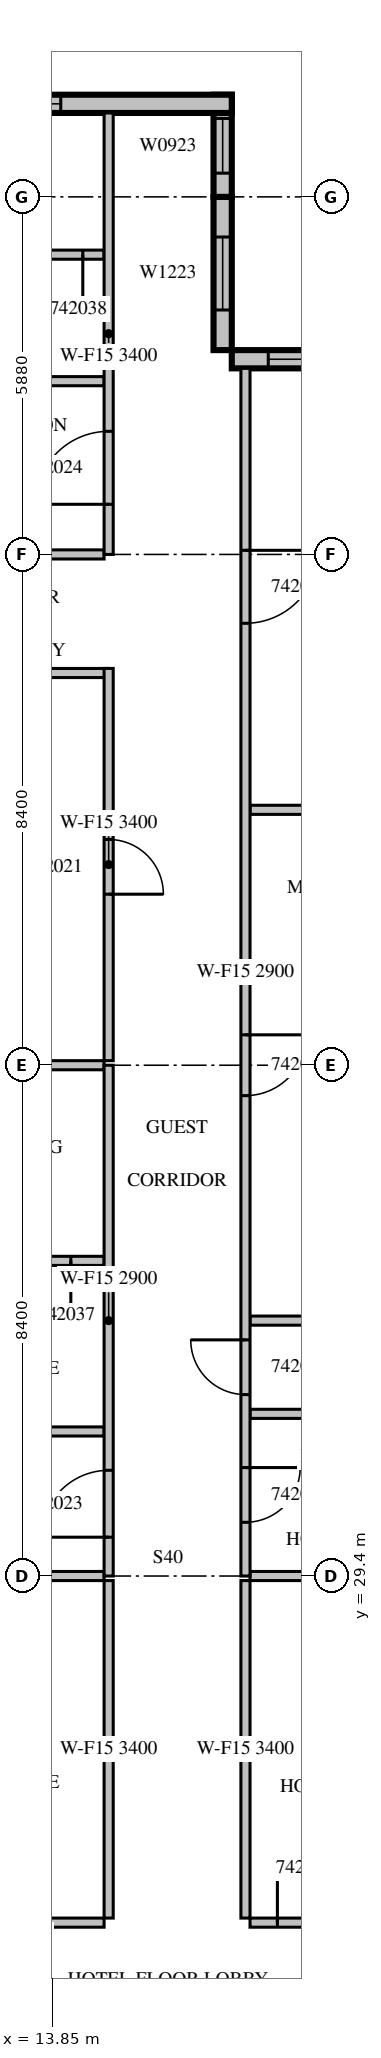
"""IFC4 building model, lengths in metres.
Left out: names, types, materials, properties, quantities, classifications, styles, units other than length and angle.
Written with IfcOpenShell. Run it as: python <this file> out.ifc"""

import sys

from ifc_helpers import new_model, si_unit, direction, frame, frame_2d, origin, place, context, subcontext, project, spatial, rectangle, extrude, source, transform, mapped, element, fill, save


model = new_model("IFC4")
c1 = context("Model", 3, precision=1e-05, world=origin(), true_north=direction((0.0, 1.0)))
c2 = subcontext(c1, "Body", "Model", "MODEL_VIEW")
j1 = project(units=[si_unit("LENGTHUNIT", "METRE"), si_unit("PLANEANGLEUNIT", "RADIAN")], contexts=[c1])
p1 = place(None, origin())
s1 = spatial("IfcSite", under=j1, at=p1, CompositionType="ELEMENT")
p2 = place(p1, origin())
s2 = spatial("IfcBuilding", under=s1, at=p2, CompositionType="ELEMENT")
p3 = place(p2, frame((0.0, 0.0, 193.0)))
s3 = spatial("IfcBuildingStorey", under=s2, at=p3, CompositionType="ELEMENT", Elevation=193.0)
m1 = source(origin(), c2, "Body", "SweptSolid", [
    extrude(rectangle(XDim=4.2, YDim=0.3, at=frame_2d((2.1, 0.0))), origin(), (0.0, 0.0, 1.0), 3.4),
])
p4 = place(p3, frame((21.0, 49.41, 0.0), z_axis=(0.0, 0.0, 1.0), x_axis=(-1.0, 0.0, 0.0)))
e1 = element("IfcWall", 1, at=p4, inside=s3, PredefinedType="STANDARD", context=c2, shape_type="MappedRepresentation", body=[
    mapped(m1, transform((0.0, 0.0, 0.0), scale=1.0)),
])
m2 = source(origin(), c2, "Body", "SweptSolid", [
    extrude(rectangle(XDim=3.0, YDim=2.3, at=frame_2d((1.5, 1.15))), frame((0.0, 0.16, 0.0), z_axis=(0.0, -1.0, 0.0), x_axis=(1.0, 0.0, 0.0)), (0.0, 0.0, 1.0), 0.32),
])
p5 = place(p4, frame((0.6, 0.0, 0.6)))
e2 = element("IfcOpeningElement", 2, at=p5, cuts=e1, PredefinedType="OPENING", context=c2, shape_type="MappedRepresentation", body=[
    mapped(m2, transform((0.0, 0.0, 0.0), scale=1.0)),
])
m3 = source(origin(), c2, "Body", "SweptSolid", [
    extrude(rectangle(XDim=2.52, YDim=0.3, at=frame_2d((1.26, 0.0))), origin(), (0.0, 0.0, 1.0), 3.4),
])
p6 = place(p3, frame((16.65, 49.56, 0.0), z_axis=(0.0, 0.0, 1.0), x_axis=(0.0, 1.0, 0.0)))
e3 = element("IfcWall", 3, at=p6, inside=s3, PredefinedType="STANDARD", context=c2, shape_type="MappedRepresentation", body=[
    mapped(m3, transform((0.0, 0.0, 0.0), scale=1.0)),
])
m4 = source(origin(), c2, "Body", "SweptSolid", [
    extrude(rectangle(XDim=1.2, YDim=2.3, at=frame_2d((0.6, 1.15))), frame((0.0, 0.16, 0.0), z_axis=(0.0, -1.0, 0.0), x_axis=(1.0, 0.0, 0.0)), (0.0, 0.0, 1.0), 0.32),
])
p7 = place(p6, frame((0.66, 0.0, 0.6)))
e4 = element("IfcOpeningElement", 4, at=p7, cuts=e3, PredefinedType="OPENING", context=c2, shape_type="MappedRepresentation", body=[
    mapped(m4, transform((0.0, 0.0, 0.0), scale=1.0)),
])
m5 = source(origin(), c2, "Body", "SweptSolid", [
    extrude(rectangle(XDim=1.68, YDim=0.3, at=frame_2d((0.84, 0.0))), origin(), (0.0, 0.0, 1.0), 3.4),
])
p8 = place(p3, frame((16.65, 52.08, 0.0), z_axis=(0.0, 0.0, 1.0), x_axis=(0.0, 1.0, 0.0)))
e5 = element("IfcWall", 5, at=p8, inside=s3, PredefinedType="STANDARD", context=c2, shape_type="MappedRepresentation", body=[
    mapped(m5, transform((0.0, 0.0, 0.0), scale=1.0)),
])
m6 = source(origin(), c2, "Body", "SweptSolid", [
    extrude(rectangle(XDim=0.9, YDim=2.3, at=frame_2d((0.45, 1.15))), frame((0.0, 0.16, 0.0), z_axis=(0.0, -1.0, 0.0), x_axis=(1.0, 0.0, 0.0)), (0.0, 0.0, 1.0), 0.32),
])
p9 = place(p8, frame((0.39, 0.0, 0.6)))
e6 = element("IfcOpeningElement", 6, at=p9, cuts=e5, PredefinedType="OPENING", context=c2, shape_type="MappedRepresentation", body=[
    mapped(m6, transform((0.0, 0.0, 0.0), scale=1.0)),
])
m7 = source(origin(), c2, "Body", "SweptSolid", [
    extrude(rectangle(XDim=10.5, YDim=0.3, at=frame_2d((5.25, 0.0))), origin(), (0.0, 0.0, 1.0), 3.4),
])
p10 = place(p3, frame((16.8, 53.61, 0.0), z_axis=(0.0, 0.0, 1.0), x_axis=(-1.0, 0.0, 0.0)))
e7 = element("IfcWall", 7, at=p10, inside=s3, PredefinedType="STANDARD", context=c2, shape_type="MappedRepresentation", body=[
    mapped(m7, transform((0.0, 0.0, 0.0), scale=1.0)),
])
m8 = source(origin(), c2, "Body", "SweptSolid", [
    extrude(rectangle(XDim=1.8, YDim=2.3, at=frame_2d((0.9, 1.15))), frame((0.0, 0.16, 0.0), z_axis=(0.0, -1.0, 0.0), x_axis=(1.0, 0.0, 0.0)), (0.0, 0.0, 1.0), 0.32),
])
p11 = place(p10, frame((8.025, 0.0, 0.6)))
e8 = element("IfcOpeningElement", 8, at=p11, cuts=e7, PredefinedType="OPENING", context=c2, shape_type="MappedRepresentation", body=[
    mapped(m8, transform((0.0, 0.0, 0.0), scale=1.0)),
])
m9 = source(origin(), c2, "Body", "SweptSolid", [
    extrude(rectangle(XDim=2.4, YDim=2.3, at=frame_2d((1.2, 1.15))), frame((0.0, 0.16, 0.0), z_axis=(0.0, -1.0, 0.0), x_axis=(1.0, 0.0, 0.0)), (0.0, 0.0, 1.0), 0.32),
])
p12 = place(p10, frame((2.812, 0.0, 0.6)))
e9 = element("IfcOpeningElement", 9, at=p12, cuts=e7, PredefinedType="OPENING", context=c2, shape_type="MappedRepresentation", body=[
    mapped(m9, transform((0.0, 0.0, 0.0), scale=1.0)),
])
p13 = place(p3, frame((10.705, 23.7, 0.0), z_axis=(0.0, 0.0, 1.0), x_axis=(1.0, 0.0, 0.0)))
e10 = element("IfcWall", 10, at=p13, inside=s3, PredefinedType="PARTITIONING", context=c2, shape_type="SweptSolid", body=[
    extrude(rectangle(XDim=3.995, YDim=0.15, at=frame_2d((1.998, 0.0))), origin(), (0.0, 0.0, 1.0), 3.4),
])
m10 = source(origin(), c2, "Body", "SweptSolid", [
    extrude(rectangle(XDim=0.9, YDim=2.1, at=frame_2d((0.45, 1.05))), frame((0.0, 0.085, 0.0), z_axis=(0.0, -1.0, 0.0), x_axis=(1.0, 0.0, 0.0)), (0.0, 0.0, 1.0), 0.17),
])
p14 = place(p13, frame((2.132, 0.0, 0.0)))
e11 = element("IfcOpeningElement", 11, at=p14, cuts=e10, PredefinedType="OPENING", context=c2, shape_type="MappedRepresentation", body=[
    mapped(m10, transform((0.0, 0.0, 0.0), scale=1.0)),
])
m11 = source(origin(), c2, "Body", "SweptSolid", [
    extrude(rectangle(XDim=3.6, YDim=0.15, at=frame_2d((1.8, 0.0))), origin(), (0.0, 0.0, 1.0), 3.4),
])
p15 = place(p3, frame((17.1, 23.7, 0.0), z_axis=(0.0, 0.0, 1.0), x_axis=(1.0, 0.0, 0.0)))
e12 = element("IfcWall", 12, at=p15, inside=s3, PredefinedType="PARTITIONING", context=c2, shape_type="MappedRepresentation", body=[
    mapped(m11, transform((0.0, 0.0, 0.0), scale=1.0)),
])
p16 = place(p15, frame((0.45, 0.0, 0.0)))
e13 = element("IfcOpeningElement", 13, at=p16, cuts=e12, PredefinedType="OPENING", context=c2, shape_type="MappedRepresentation", body=[
    mapped(m10, transform((0.0, 0.0, 0.0), scale=1.0)),
])
m12 = source(origin(), c2, "Body", "SweptSolid", [
    extrude(rectangle(XDim=5.55, YDim=0.15, at=frame_2d((2.775, 0.0))), origin(), (0.0, 0.0, 1.0), 3.4),
])
for number, where, z_axis, x_axis in (
    (14, (14.775, 23.775, 0.0), (0.0, 0.0, 1.0), (0.0, 1.0, 0.0)),
    (15, (17.025, 29.325, 0.0), (0.0, 0.0, 1.0), (0.0, -1.0, 0.0)),
):
    element("IfcWall", number, at=place(p3, frame(where, z_axis=z_axis, x_axis=x_axis)), inside=s3, PredefinedType="PARTITIONING", context=c2, shape_type="MappedRepresentation", body=[
        mapped(m12, transform((0.0, 0.0, 0.0), scale=1.0)),
    ])
m13 = source(origin(), c2, "Body", "SweptSolid", [
    extrude(rectangle(XDim=3.751, YDim=0.15, at=frame_2d((1.875, 0.0))), origin(), (0.0, 0.0, 1.0), 3.4),
])
p17 = place(p3, frame((14.7, 29.4, 0.0), z_axis=(0.0, 0.0, 1.0), x_axis=(-1.0, 0.0, 0.0)))
e16 = element("IfcWall", 16, at=p17, inside=s3, PredefinedType="PARTITIONING", context=c2, shape_type="MappedRepresentation", body=[
    mapped(m13, transform((0.0, 0.0, 0.0), scale=1.0)),
])
m14 = source(origin(), c2, "Body", "SweptSolid", [
    extrude(rectangle(XDim=3.001, YDim=0.15, at=frame_2d((1.5, 0.0))), origin(), (0.0, 0.0, 1.0), 3.4),
])
p18 = place(p3, frame((20.101, 29.4, 0.0), z_axis=(0.0, 0.0, 1.0), x_axis=(-1.0, 0.0, 0.0)))
e17 = element("IfcWall", 17, at=p18, inside=s3, PredefinedType="PARTITIONING", context=c2, shape_type="MappedRepresentation", body=[
    mapped(m14, transform((0.0, 0.0, 0.0), scale=1.0)),
])
p19 = place(p3, frame((14.775, 44.25, 0.0), z_axis=(0.0, 0.0, 1.0), x_axis=(-1.0, 0.0, 0.0)))
e18 = element("IfcWall", 18, at=p19, inside=s3, PredefinedType="PARTITIONING", context=c2, shape_type="SweptSolid", body=[
    extrude(rectangle(XDim=2.475, YDim=0.15, at=frame_2d((1.238, 0.0))), origin(), (0.0, 0.0, 1.0), 3.4),
])
m15 = source(origin(), c2, "Body", "SweptSolid", [
    extrude(rectangle(XDim=6.45, YDim=0.15, at=frame_2d((3.225, 0.0))), origin(), (0.0, 0.0, 1.0), 3.4),
])
p20 = place(p3, frame((14.775, 37.875, 0.0), z_axis=(0.0, 0.0, 1.0), x_axis=(0.0, 1.0, 0.0)))
e19 = element("IfcWall", 19, at=p20, inside=s3, PredefinedType="PARTITIONING", context=c2, shape_type="MappedRepresentation", body=[
    mapped(m15, transform((0.0, 0.0, 0.0), scale=1.0)),
])
p21 = place(p20, frame((2.737, 0.0, 0.0)))
e20 = element("IfcOpeningElement", 20, at=p21, cuts=e19, PredefinedType="OPENING", context=c2, shape_type="MappedRepresentation", body=[
    mapped(m10, transform((0.0, 0.0, 0.0), scale=1.0)),
])
m16 = source(origin(), c2, "Body", "SweptSolid", [
    extrude(rectangle(XDim=3.995, YDim=0.15, at=frame_2d((1.998, 0.0))), origin(), (0.0, 0.0, 1.0), 3.4),
])
p22 = place(p3, frame((14.7, 31.777, 0.0), z_axis=(0.0, 0.0, 1.0), x_axis=(-1.0, 0.0, 0.0)))
e21 = element("IfcWall", 21, at=p22, inside=s3, PredefinedType="PARTITIONING", context=c2, shape_type="MappedRepresentation", body=[
    mapped(m16, transform((0.0, 0.0, 0.0), scale=1.0)),
])
p23 = place(p22, frame((1.548, 0.0, 0.0)))
e22 = element("IfcOpeningElement", 22, at=p23, cuts=e21, PredefinedType="OPENING", context=c2, shape_type="MappedRepresentation", body=[
    mapped(m10, transform((0.0, 0.0, 0.0), scale=1.0)),
])
p24 = place(p3, frame((14.7, 34.583, 0.0), z_axis=(0.0, 0.0, 1.0), x_axis=(-1.0, 0.0, 0.0)))
e23 = element("IfcWall", 23, at=p24, inside=s3, PredefinedType="PARTITIONING", context=c2, shape_type="MappedRepresentation", body=[
    mapped(m16, transform((0.0, 0.0, 0.0), scale=1.0)),
])
p25 = place(p24, frame((1.548, 0.0, 0.0)))
e24 = element("IfcOpeningElement", 24, at=p25, cuts=e23, PredefinedType="OPENING", context=c2, shape_type="MappedRepresentation", body=[
    mapped(m10, transform((0.0, 0.0, 0.0), scale=1.0)),
])
p26 = place(p24, frame((0.547, 0.0, 0.0)))
e25 = element("IfcOpeningElement", 25, at=p26, cuts=e23, PredefinedType="OPENING", context=c2, shape_type="MappedRepresentation", body=[
    mapped(m10, transform((0.0, 0.0, 0.0), scale=1.0)),
])
p27 = place(p24, frame((2.547, 0.0, 0.0)))
e26 = element("IfcOpeningElement", 26, at=p27, cuts=e23, PredefinedType="OPENING", context=c2, shape_type="MappedRepresentation", body=[
    mapped(m10, transform((0.0, 0.0, 0.0), scale=1.0)),
])
p28 = place(p3, frame((14.7, 37.8, 0.0), z_axis=(0.0, 0.0, 1.0), x_axis=(-1.0, 0.0, 0.0)))
e27 = element("IfcWall", 27, at=p28, inside=s3, PredefinedType="PARTITIONING", context=c2, shape_type="MappedRepresentation", body=[
    mapped(m13, transform((0.0, 0.0, 0.0), scale=1.0)),
])
p29 = place(p3, frame((14.7, 49.049, 0.0), z_axis=(0.0, 0.0, 1.0), x_axis=(-1.0, 0.0, 0.0)))
e28 = element("IfcWall", 28, at=p29, inside=s3, PredefinedType="PARTITIONING", context=c2, shape_type="MappedRepresentation", body=[
    mapped(m11, transform((0.0, 0.0, 0.0), scale=1.0)),
])
p30 = place(p3, frame((14.7, 51.13, 0.0), z_axis=(0.0, 0.0, 1.0), x_axis=(-1.0, 0.0, 0.0)))
e29 = element("IfcWall", 29, at=p30, inside=s3, PredefinedType="PARTITIONING", context=c2, shape_type="MappedRepresentation", body=[
    mapped(m11, transform((0.0, 0.0, 0.0), scale=1.0)),
])
p31 = place(p30, frame((1.35, 0.0, 0.0)))
e30 = element("IfcOpeningElement", 30, at=p31, cuts=e29, PredefinedType="OPENING", context=c2, shape_type="MappedRepresentation", body=[
    mapped(m10, transform((0.0, 0.0, 0.0), scale=1.0)),
])
p32 = place(p30, frame((0.35, 0.0, 0.0)))
e31 = element("IfcOpeningElement", 31, at=p32, cuts=e29, PredefinedType="OPENING", context=c2, shape_type="MappedRepresentation", body=[
    mapped(m10, transform((0.0, 0.0, 0.0), scale=1.0)),
])
p33 = place(p30, frame((2.35, 0.0, 0.0)))
e32 = element("IfcOpeningElement", 32, at=p33, cuts=e29, PredefinedType="OPENING", context=c2, shape_type="MappedRepresentation", body=[
    mapped(m10, transform((0.0, 0.0, 0.0), scale=1.0)),
])
p34 = place(p3, frame((14.7, 46.2, 0.0), z_axis=(0.0, 0.0, 1.0), x_axis=(-1.0, 0.0, 0.0)))
e33 = element("IfcWall", 33, at=p34, inside=s3, PredefinedType="PARTITIONING", context=c2, shape_type="MappedRepresentation", body=[
    mapped(m11, transform((0.0, 0.0, 0.0), scale=1.0)),
])
m17 = source(origin(), c2, "Body", "SweptSolid", [
    extrude(rectangle(XDim=3.6, YDim=0.15, at=frame_2d((1.8, 0.0))), origin(), (0.0, 0.0, 1.0), 2.4),
])
for number, where, z_axis, x_axis in (
    (34, (17.1, 32.067, 0.0), (0.0, 0.0, 1.0), (1.0, 0.0, 0.0)),
    (35, (20.7, 33.6, 0.0), (0.0, 0.0, 1.0), (-1.0, 0.0, 0.0)),
):
    element("IfcWall", number, at=place(p3, frame(where, z_axis=z_axis, x_axis=x_axis)), inside=s3, PredefinedType="PARTITIONING", context=c2, shape_type="MappedRepresentation", body=[
        mapped(m17, transform((0.0, 0.0, 0.0), scale=1.0)),
    ])
p35 = place(p3, frame((20.7, 42.0, 0.0), z_axis=(0.0, 0.0, 1.0), x_axis=(-1.0, 0.0, 0.0)))
e36 = element("IfcWall", 36, at=p35, inside=s3, PredefinedType="PARTITIONING", context=c2, shape_type="MappedRepresentation", body=[
    mapped(m11, transform((0.0, 0.0, 0.0), scale=1.0)),
])
m18 = source(origin(), c2, "Body", "SweptSolid", [
    extrude(rectangle(XDim=8.4, YDim=0.15, at=frame_2d((4.2, 0.0))), origin(), (0.0, 0.0, 1.0), 2.9),
])
p36 = place(p3, frame((14.775, 29.4, 0.0), z_axis=(0.0, 0.0, 1.0), x_axis=(0.0, 1.0, 0.0)))
e37 = element("IfcWall", 37, at=p36, inside=s3, PredefinedType="PARTITIONING", context=c2, shape_type="MappedRepresentation", body=[
    mapped(m18, transform((0.0, 0.0, 0.0), scale=1.0)),
])
m19 = source(origin(), c2, "Body", "SweptSolid", [
    extrude(rectangle(XDim=1.1, YDim=2.1, at=frame_2d((0.55, 1.05))), frame((0.0, 0.085, 0.0), z_axis=(0.0, -1.0, 0.0), x_axis=(1.0, 0.0, 0.0)), (0.0, 0.0, 1.0), 0.17),
])
p37 = place(p36, frame((0.638, 0.0, 0.0)))
e38 = element("IfcOpeningElement", 38, at=p37, cuts=e37, PredefinedType="OPENING", context=c2, shape_type="MappedRepresentation", body=[
    mapped(m19, transform((0.0, 0.0, 0.0), scale=1.0)),
])
m20 = source(origin(), c2, "Body", "SweptSolid", [
    extrude(rectangle(XDim=7.26, YDim=0.15, at=frame_2d((3.63, 0.0))), origin(), (0.0, 0.0, 1.0), 3.4),
])
p38 = place(p3, frame((14.775, 46.2, 0.0), z_axis=(0.0, 0.0, 1.0), x_axis=(0.0, 1.0, 0.0)))
e39 = element("IfcWall", 39, at=p38, inside=s3, PredefinedType="PARTITIONING", context=c2, shape_type="MappedRepresentation", body=[
    mapped(m20, transform((0.0, 0.0, 0.0), scale=1.0)),
])
m21 = source(origin(), c2, "Body", "SweptSolid", [
    extrude(rectangle(XDim=1.2, YDim=2.1, at=frame_2d((0.6, 1.05))), frame((0.0, 0.085, 0.0), z_axis=(0.0, -1.0, 0.0), x_axis=(1.0, 0.0, 0.0)), (0.0, 0.0, 1.0), 0.17),
])
p39 = place(p38, frame((0.825, 0.0, 0.0)))
e40 = element("IfcOpeningElement", 40, at=p39, cuts=e39, PredefinedType="OPENING", context=c2, shape_type="MappedRepresentation", body=[
    mapped(m21, transform((0.0, 0.0, 0.0), scale=1.0)),
])
m22 = source(origin(), c2, "Body", "SweptSolid", [
    extrude(rectangle(XDim=19.86, YDim=0.15, at=frame_2d((9.93, 0.0))), origin(), (0.0, 0.0, 1.0), 2.9),
])
p40 = place(p3, frame((17.025, 49.26, 0.0), z_axis=(0.0, 0.0, 1.0), x_axis=(0.0, -1.0, 0.0)))
e41 = element("IfcWall", 41, at=p40, inside=s3, PredefinedType="PARTITIONING", context=c2, shape_type="MappedRepresentation", body=[
    mapped(m22, transform((0.0, 0.0, 0.0), scale=1.0)),
])
p41 = place(p40, frame((18.076, 0.0, 0.0)))
e42 = element("IfcOpeningElement", 42, at=p41, cuts=e41, PredefinedType="OPENING", context=c2, shape_type="MappedRepresentation", body=[
    mapped(m10, transform((0.0, 0.0, 0.0), scale=1.0)),
])
p42 = place(p40, frame((15.976, 0.0, 0.0)))
e43 = element("IfcOpeningElement", 43, at=p42, cuts=e41, PredefinedType="OPENING", context=c2, shape_type="MappedRepresentation", body=[
    mapped(m10, transform((0.0, 0.0, 0.0), scale=1.0)),
])
m23 = source(origin(), c2, "Body", "SweptSolid", [
    extrude(rectangle(XDim=1.0, YDim=2.1, at=frame_2d((0.5, 1.05))), frame((0.0, 0.085, 0.0), z_axis=(0.0, -1.0, 0.0), x_axis=(1.0, 0.0, 0.0)), (0.0, 0.0, 1.0), 0.17),
])
p43 = place(p40, frame((10.96, 0.0, 0.0)))
e44 = element("IfcOpeningElement", 44, at=p43, cuts=e41, PredefinedType="OPENING", context=c2, shape_type="MappedRepresentation", body=[
    mapped(m23, transform((0.0, 0.0, 0.0), scale=1.0)),
])
p44 = place(p40, frame((2.993, 0.0, 0.0)))
e45 = element("IfcOpeningElement", 45, at=p44, cuts=e41, PredefinedType="OPENING", context=c2, shape_type="MappedRepresentation", body=[
    mapped(m21, transform((0.0, 0.0, 0.0), scale=1.0)),
])
m24 = source(origin(), c2, "Body", "SweptSolid", [
    extrude(rectangle(XDim=3.0, YDim=2.3, at=frame_2d((1.5, 1.15))), frame((0.0, 0.03, 0.0), z_axis=(0.0, -1.0, 0.0), x_axis=(1.0, 0.0, 0.0)), (0.0, 0.0, 1.0), 0.06),
])
p45 = place(p5, origin())
e46 = element("IfcWindow", 46, at=p45, inside=s3, PartitioningType="SINGLE_PANEL", PredefinedType="WINDOW", context=c2, shape_type="MappedRepresentation", body=[
    mapped(m24, transform((0.0, 0.0, 0.0), scale=1.0)),
])
fill(e2, e46)
m25 = source(origin(), c2, "Body", "SweptSolid", [
    extrude(rectangle(XDim=1.2, YDim=2.3, at=frame_2d((0.6, 1.15))), frame((0.0, 0.03, 0.0), z_axis=(0.0, -1.0, 0.0), x_axis=(1.0, 0.0, 0.0)), (0.0, 0.0, 1.0), 0.06),
])
p46 = place(p7, origin())
e47 = element("IfcWindow", 47, at=p46, inside=s3, PartitioningType="SINGLE_PANEL", PredefinedType="WINDOW", context=c2, shape_type="MappedRepresentation", body=[
    mapped(m25, transform((0.0, 0.0, 0.0), scale=1.0)),
])
fill(e4, e47)
m26 = source(origin(), c2, "Body", "SweptSolid", [
    extrude(rectangle(XDim=0.9, YDim=2.3, at=frame_2d((0.45, 1.15))), frame((0.0, 0.03, 0.0), z_axis=(0.0, -1.0, 0.0), x_axis=(1.0, 0.0, 0.0)), (0.0, 0.0, 1.0), 0.06),
])
p47 = place(p9, origin())
e48 = element("IfcWindow", 48, at=p47, inside=s3, PartitioningType="SINGLE_PANEL", PredefinedType="WINDOW", context=c2, shape_type="MappedRepresentation", body=[
    mapped(m26, transform((0.0, 0.0, 0.0), scale=1.0)),
])
fill(e6, e48)
m27 = source(origin(), c2, "Body", "SweptSolid", [
    extrude(rectangle(XDim=2.4, YDim=2.3, at=frame_2d((1.2, 1.15))), frame((0.0, 0.03, 0.0), z_axis=(0.0, -1.0, 0.0), x_axis=(1.0, 0.0, 0.0)), (0.0, 0.0, 1.0), 0.06),
])
p48 = place(p12, origin())
e49 = element("IfcWindow", 49, at=p48, inside=s3, PartitioningType="SINGLE_PANEL", PredefinedType="WINDOW", context=c2, shape_type="MappedRepresentation", body=[
    mapped(m27, transform((0.0, 0.0, 0.0), scale=1.0)),
])
fill(e9, e49)
m28 = source(origin(), c2, "Body", "SweptSolid", [
    extrude(rectangle(XDim=0.9, YDim=2.1, at=frame_2d((0.45, 1.05))), frame((0.0, 0.025, 0.0), z_axis=(0.0, -1.0, 0.0), x_axis=(1.0, 0.0, 0.0)), (0.0, 0.0, 1.0), 0.05),
])
p49 = place(p16, origin())
e50 = element("IfcDoor", 50, at=p49, inside=s3, OperationType="SINGLE_SWING_LEFT", PredefinedType="DOOR", context=c2, shape_type="MappedRepresentation", body=[
    mapped(m28, transform((0.0, 0.0, 0.0), scale=1.0)),
])
fill(e13, e50)
p50 = place(p21, origin())
e51 = element("IfcDoor", 51, at=p50, inside=s3, OperationType="SINGLE_SWING_RIGHT", PredefinedType="DOOR", context=c2, shape_type="MappedRepresentation", body=[
    mapped(m28, transform((0.0, 0.0, 0.0), scale=1.0)),
])
fill(e20, e51)
m29 = source(origin(), c2, "Body", "SweptSolid", [
    extrude(rectangle(XDim=1.1, YDim=2.1, at=frame_2d((0.55, 1.05))), frame((0.0, 0.025, 0.0), z_axis=(0.0, -1.0, 0.0), x_axis=(1.0, 0.0, 0.0)), (0.0, 0.0, 1.0), 0.05),
])
p51 = place(p37, origin())
e52 = element("IfcDoor", 52, at=p51, inside=s3, OperationType="SINGLE_SWING_LEFT", PredefinedType="DOOR", context=c2, shape_type="MappedRepresentation", body=[
    mapped(m29, transform((0.0, 0.0, 0.0), scale=1.0)),
])
fill(e38, e52)
m30 = source(origin(), c2, "Body", "SweptSolid", [
    extrude(rectangle(XDim=1.2, YDim=2.1, at=frame_2d((0.6, 1.05))), frame((0.0, 0.025, 0.0), z_axis=(0.0, -1.0, 0.0), x_axis=(1.0, 0.0, 0.0)), (0.0, 0.0, 1.0), 0.05),
])
p52 = place(p39, origin())
e53 = element("IfcDoor", 53, at=p52, inside=s3, OperationType="SINGLE_SWING_LEFT", PredefinedType="DOOR", context=c2, shape_type="MappedRepresentation", body=[
    mapped(m30, transform((0.0, 0.0, 0.0), scale=1.0)),
])
fill(e40, e53)
p53 = place(p41, origin())
e54 = element("IfcDoor", 54, at=p53, inside=s3, OperationType="SINGLE_SWING_LEFT", PredefinedType="DOOR", context=c2, shape_type="MappedRepresentation", body=[
    mapped(m28, transform((0.0, 0.0, 0.0), scale=1.0)),
])
fill(e42, e54)
p54 = place(p42, origin())
e55 = element("IfcDoor", 55, at=p54, inside=s3, OperationType="SINGLE_SWING_RIGHT", PredefinedType="DOOR", context=c2, shape_type="MappedRepresentation", body=[
    mapped(m28, transform((0.0, 0.0, 0.0), scale=1.0)),
])
fill(e43, e55)
m31 = source(origin(), c2, "Body", "SweptSolid", [
    extrude(rectangle(XDim=1.0, YDim=2.1, at=frame_2d((0.5, 1.05))), frame((0.0, 0.025, 0.0), z_axis=(0.0, -1.0, 0.0), x_axis=(1.0, 0.0, 0.0)), (0.0, 0.0, 1.0), 0.05),
])
p55 = place(p43, origin())
e56 = element("IfcDoor", 56, at=p55, inside=s3, OperationType="SINGLE_SWING_LEFT", PredefinedType="DOOR", context=c2, shape_type="MappedRepresentation", body=[
    mapped(m31, transform((0.0, 0.0, 0.0), scale=1.0)),
])
fill(e44, e56)
p56 = place(p44, origin())
e57 = element("IfcDoor", 57, at=p56, inside=s3, OperationType="SINGLE_SWING_LEFT", PredefinedType="DOOR", context=c2, shape_type="MappedRepresentation", body=[
    mapped(m30, transform((0.0, 0.0, 0.0), scale=1.0)),
])
fill(e45, e57)
p57 = place(p26, origin())
e58 = element("IfcDoor", 58, at=p57, inside=s3, OperationType="SINGLE_SWING_LEFT", PredefinedType="DOOR", context=c2, shape_type="MappedRepresentation", body=[
    mapped(m28, transform((0.0, 0.0, 0.0), scale=1.0)),
])
fill(e25, e58)
p58 = place(p32, origin())
e59 = element("IfcDoor", 59, at=p58, inside=s3, OperationType="SINGLE_SWING_LEFT", PredefinedType="DOOR", context=c2, shape_type="MappedRepresentation", body=[
    mapped(m28, transform((0.0, 0.0, 0.0), scale=1.0)),
])
fill(e31, e59)
save(model, sys.argv[1])
